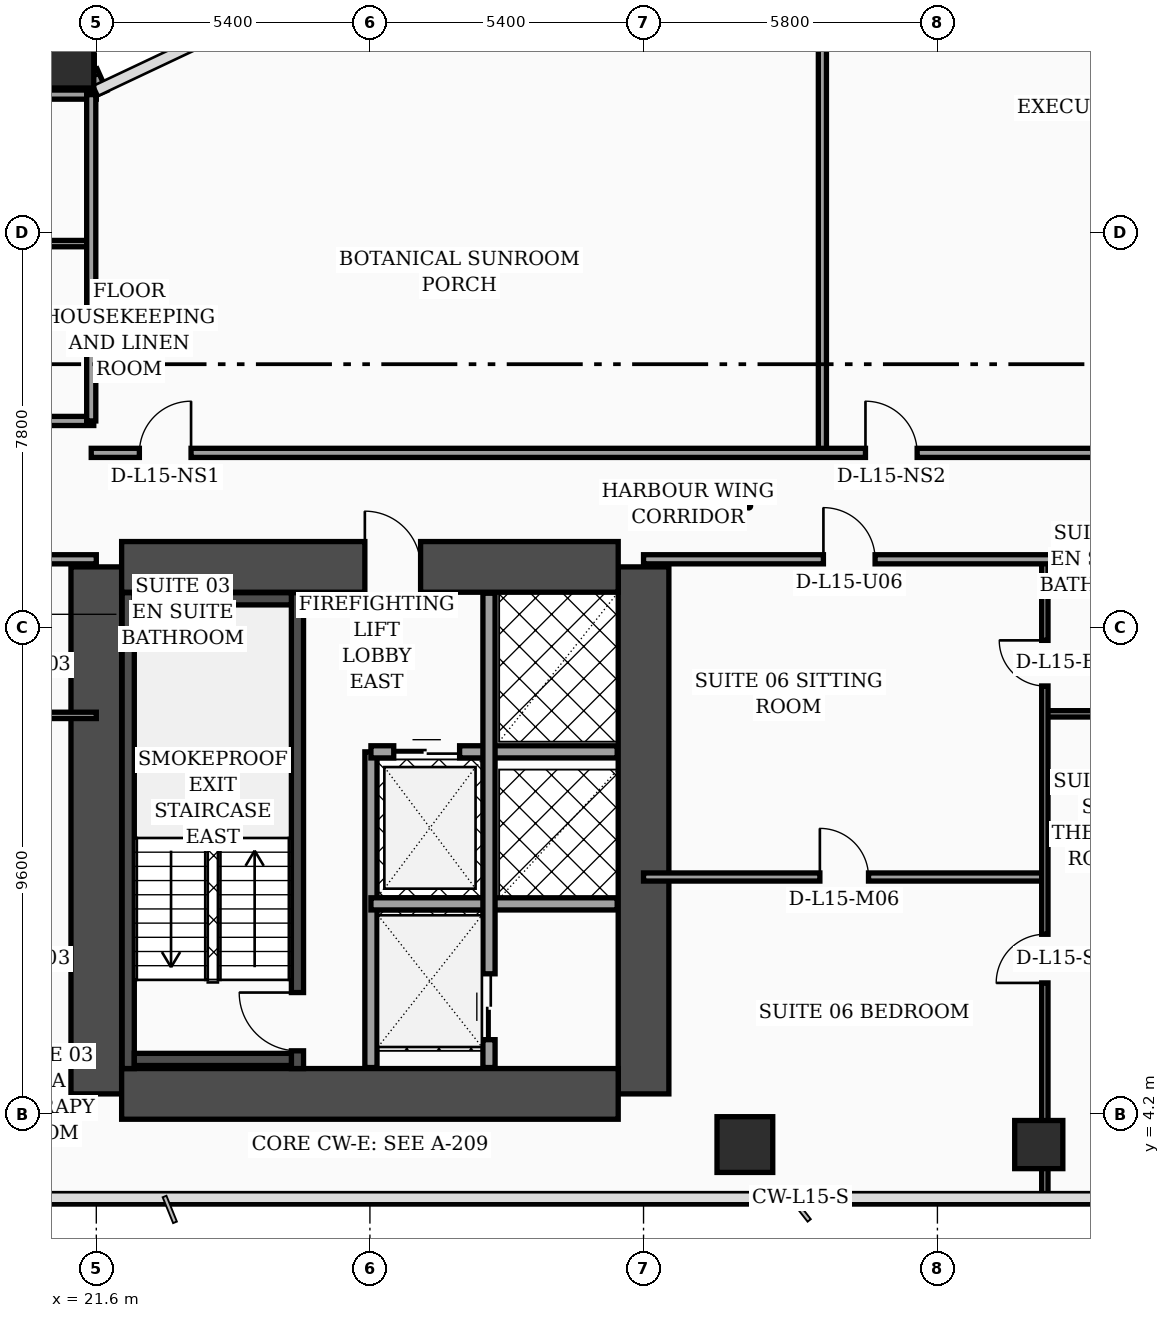
"""IFC4 building model, lengths in metres.
Left out: names, types, materials, properties, quantities, classifications, styles, units other than length and angle.
Written with IfcOpenShell. Run it as: python <this file> out.ifc"""

import sys

from ifc_helpers import new_model, si_unit, direction, frame, frame_2d, origin, origin_2d, place, context, subcontext, project, spatial, rectangle, hollow_rectangle, extrude, element, fill, save


model = new_model("IFC4")
c1 = context("Model", 3, precision=1e-05, world=origin(), true_north=direction((0.0, 1.0)))
c2 = subcontext(c1, "Body", "Model", "MODEL_VIEW")
j1 = project(units=[si_unit("LENGTHUNIT", "METRE"), si_unit("PLANEANGLEUNIT", "RADIAN")], contexts=[c1])
p1 = place(None, origin())
s1 = spatial("IfcSite", under=j1, at=p1, CompositionType="ELEMENT")
p2 = place(p1, origin())
s2 = spatial("IfcBuilding", under=s1, at=p2, CompositionType="ELEMENT")
p3 = place(p2, frame((0.0, 0.0, 66.0)))
s3 = spatial("IfcBuildingStorey", under=s2, at=p3, CompositionType="ELEMENT", Elevation=66.0)
for number, where, z_axis, x_axis in (
    (1, (21.6, 4.6, 0.0), (0.0, 0.0, 1.0), (0.0, 1.0, 0.0)),
    (2, (32.4, 4.6, 0.0), (0.0, 0.0, 1.0), (0.0, 1.0, 0.0)),
):
    element("IfcWall", number, at=place(p3, frame(where, z_axis=z_axis, x_axis=x_axis)), inside=s3, PredefinedType="SHEAR", context=c2, shape_type="SweptSolid", body=[
        extrude(rectangle(XDim=10.4, YDim=1.0, at=frame_2d((5.2, 0.0))), origin(), (0.0, 0.0, 1.0), 3.56),
    ])
p4 = place(p3, frame((22.1, 15.0, 0.0), z_axis=(0.0, 0.0, 1.0), x_axis=(1.0, 0.0, 0.0)))
e3 = element("IfcWall", 3, at=p4, inside=s3, PredefinedType="SHEAR", context=c2, shape_type="SweptSolid", body=[
    extrude(rectangle(XDim=9.8, YDim=1.0, at=frame_2d((4.9, 0.0))), origin(), (0.0, 0.0, 1.0), 3.56),
])
p5 = place(p4, frame((4.8, 0.0, 0.0)))
e4 = element("IfcOpeningElement", 4, at=p5, cuts=e3, PredefinedType="OPENING", context=c2, shape_type="SweptSolid", body=[
    extrude(rectangle(XDim=1.1, YDim=2.2, at=frame_2d((0.55, 1.1))), frame((0.0, 0.51, 0.0), z_axis=(0.0, -1.0, 0.0), x_axis=(1.0, 0.0, 0.0)), (0.0, 0.0, 1.0), 1.02),
])
p6 = place(p3, frame((22.1, 4.6, 0.0), z_axis=(0.0, 0.0, 1.0), x_axis=(1.0, 0.0, 0.0)))
e5 = element("IfcWall", 5, at=p6, inside=s3, PredefinedType="SHEAR", context=c2, shape_type="SweptSolid", body=[
    extrude(rectangle(XDim=9.8, YDim=1.0, at=frame_2d((4.9, 0.0))), origin(), (0.0, 0.0, 1.0), 3.56),
])
p7 = place(p3, frame((22.23, 5.1, 0.0), z_axis=(0.0, 0.0, 1.0), x_axis=(0.0, 1.0, 0.0)))
e6 = element("IfcWall", 6, at=p7, inside=s3, PredefinedType="SOLIDWALL", context=c2, shape_type="SweptSolid", body=[
    extrude(rectangle(XDim=9.39, YDim=0.24, at=frame_2d((4.695, 0.0))), origin(), (0.0, 0.0, 1.0), 3.56),
])
p8 = place(p3, frame((25.57, 5.1, 0.0), z_axis=(0.0, 0.0, 1.0), x_axis=(0.0, 1.0, 0.0)))
e7 = element("IfcWall", 7, at=p8, inside=s3, PredefinedType="SOLIDWALL", context=c2, shape_type="SweptSolid", body=[
    extrude(rectangle(XDim=9.39, YDim=0.24, at=frame_2d((4.695, 0.0))), origin(), (0.0, 0.0, 1.0), 3.56),
])
p9 = place(p8, frame((0.35, 0.0, 0.0)))
e8 = element("IfcOpeningElement", 8, at=p9, cuts=e7, PredefinedType="OPENING", context=c2, shape_type="SweptSolid", body=[
    extrude(rectangle(XDim=1.15, YDim=2.2, at=frame_2d((0.575, 1.1))), frame((0.0, 0.13, 0.0), z_axis=(0.0, -1.0, 0.0), x_axis=(1.0, 0.0, 0.0)), (0.0, 0.0, 1.0), 0.26),
])
for number, where, z_axis, x_axis in (
    (9, (22.35, 5.28, 0.0), (0.0, 0.0, 1.0), (1.0, 0.0, 0.0)),
    (10, (22.35, 14.37, 0.0), (0.0, 0.0, 1.0), (1.0, 0.0, 0.0)),
):
    element("IfcWall", number, at=place(p3, frame(where, z_axis=z_axis, x_axis=x_axis)), inside=s3, PredefinedType="SOLIDWALL", context=c2, shape_type="SweptSolid", body=[
        extrude(rectangle(XDim=3.1, YDim=0.24, at=frame_2d((1.55, 0.0))), origin(), (0.0, 0.0, 1.0), 3.56),
    ])
for number, where, z_axis, x_axis in (
    (11, (21.0, 25.0, 0.0), (0.0, 0.0, 1.0), (1.0, 0.0, 0.0)),
    (12, (34.4, 3.6, 0.0), (0.0, 0.0, 1.0), (1.0, 0.0, 0.0)),
):
    element("IfcColumn", number, at=place(p3, frame(where, z_axis=z_axis, x_axis=x_axis)), inside=s3, PredefinedType="COLUMN", context=c2, shape_type="SweptSolid", body=[
        extrude(hollow_rectangle(XDim=1.1, YDim=1.1, WallThickness=0.045, at=origin_2d()), origin(), (0.0, 0.0, 1.0), 3.56),
    ])
p10 = place(p3, frame((40.2, 3.6, 0.0), z_axis=(0.0, 0.0, 1.0), x_axis=(1.0, 0.0, 0.0)))
e13 = element("IfcColumn", 13, at=p10, inside=s3, PredefinedType="COLUMN", context=c2, shape_type="SweptSolid", body=[
    extrude(hollow_rectangle(XDim=0.95, YDim=0.95, WallThickness=0.04, at=origin_2d()), origin(), (0.0, 0.0, 1.0), 3.56),
])
p11 = place(p3, frame((21.68, 24.34, 0.0), z_axis=(0.0, 0.0, 1.0), x_axis=(-0.40758134973, 0.913168901875, 0.0)))
e14 = element("IfcWall", 14, at=p11, inside=s3, PredefinedType="SOLIDWALL", context=c2, shape_type="SweptSolid", body=[
    extrude(rectangle(XDim=0.471, YDim=0.28, at=frame_2d((0.235, 0.0))), origin(), (0.0, 0.0, 1.0), 3.56),
])
p12 = place(p3, frame((27.02, 5.12, 0.0), z_axis=(0.0, 0.0, 1.0), x_axis=(0.0, 1.0, 0.0)))
e15 = element("IfcWall", 15, at=p12, inside=s3, PredefinedType="SOLIDWALL", context=c2, shape_type="SweptSolid", body=[
    extrude(rectangle(XDim=6.23, YDim=0.24, at=frame_2d((3.115, 0.0))), origin(), (0.0, 0.0, 1.0), 3.56),
])
p13 = place(p3, frame((27.02, 11.35, 0.0), z_axis=(0.0, 0.0, 1.0), x_axis=(1.0, 0.0, 0.0)))
e16 = element("IfcWall", 16, at=p13, inside=s3, PredefinedType="SOLIDWALL", context=c2, shape_type="SweptSolid", body=[
    extrude(rectangle(XDim=4.86, YDim=0.24, at=frame_2d((2.43, 0.0))), origin(), (0.0, 0.0, 1.0), 3.56),
])
p14 = place(p13, frame((0.45, 0.0, 0.0)))
e17 = element("IfcOpeningElement", 17, at=p14, cuts=e16, PredefinedType="OPENING", context=c2, shape_type="SweptSolid", body=[
    extrude(rectangle(XDim=1.3, YDim=2.35, at=frame_2d((0.65, 1.175))), frame((0.0, 0.13, 0.0), z_axis=(0.0, -1.0, 0.0), x_axis=(1.0, 0.0, 0.0)), (0.0, 0.0, 1.0), 0.26),
])
p15 = place(p3, frame((27.02, 8.35, 0.0), z_axis=(0.0, 0.0, 1.0), x_axis=(1.0, 0.0, 0.0)))
e18 = element("IfcWall", 18, at=p15, inside=s3, PredefinedType="SOLIDWALL", context=c2, shape_type="SweptSolid", body=[
    extrude(rectangle(XDim=4.86, YDim=0.24, at=frame_2d((2.43, 0.0))), origin(), (0.0, 0.0, 1.0), 3.56),
])
p16 = place(p3, frame((29.35, 5.12, 0.0), z_axis=(0.0, 0.0, 1.0), x_axis=(0.0, 1.0, 0.0)))
e19 = element("IfcWall", 19, at=p16, inside=s3, PredefinedType="SOLIDWALL", context=c2, shape_type="SweptSolid", body=[
    extrude(rectangle(XDim=9.36, YDim=0.24, at=frame_2d((4.68, 0.0))), origin(), (0.0, 0.0, 1.0), 3.56),
])
p17 = place(p16, frame((0.55, 0.0, 0.0)))
e20 = element("IfcOpeningElement", 20, at=p17, cuts=e19, PredefinedType="OPENING", context=c2, shape_type="SweptSolid", body=[
    extrude(rectangle(XDim=1.3, YDim=2.35, at=frame_2d((0.65, 1.175))), frame((0.0, 0.13, 0.0), z_axis=(0.0, -1.0, 0.0), x_axis=(1.0, 0.0, 0.0)), (0.0, 0.0, 1.0), 0.26),
])
p18 = place(p3, frame((19.6, 12.07, 0.0), z_axis=(0.0, 0.0, 1.0), x_axis=(1.0, 0.0, 0.0)))
e21 = element("IfcWall", 21, at=p18, inside=s3, PredefinedType="PARTITIONING", context=c2, shape_type="SweptSolid", body=[
    extrude(rectangle(XDim=2.0, YDim=0.125, at=frame_2d((1.0, 0.0))), origin(), (0.0, 0.0, 1.0), 3.56),
])
p19 = place(p3, frame((15.15, 15.15, 0.0), z_axis=(0.0, 0.0, 1.0), x_axis=(1.0, 0.0, 0.0)))
e22 = element("IfcWall", 22, at=p19, inside=s3, PredefinedType="PARTITIONING", context=c2, shape_type="SweptSolid", body=[
    extrude(rectangle(XDim=6.45, YDim=0.18, at=frame_2d((3.225, 0.0))), origin(), (0.0, 0.0, 1.0), 2.34),
])
p20 = place(p19, frame((1.74, 0.0, 0.0)))
e23 = element("IfcOpeningElement", 23, at=p20, cuts=e22, PredefinedType="OPENING", context=c2, shape_type="SweptSolid", body=[
    extrude(rectangle(XDim=1.02, YDim=2.2, at=frame_2d((0.51, 1.1))), frame((0.0, 0.1, 0.0), z_axis=(0.0, -1.0, 0.0), x_axis=(1.0, 0.0, 0.0)), (0.0, 0.0, 1.0), 0.2),
])
p21 = place(p3, frame((17.65, 17.88, 0.0), z_axis=(0.0, 0.0, 1.0), x_axis=(1.0, 0.0, 0.0)))
e24 = element("IfcWall", 24, at=p21, inside=s3, PredefinedType="PARTITIONING", context=c2, shape_type="SweptSolid", body=[
    extrude(rectangle(XDim=3.9, YDim=0.18, at=frame_2d((1.95, 0.0))), origin(), (0.0, 0.0, 1.0), 3.56),
])
p22 = place(p3, frame((17.65, 21.38, 0.0), z_axis=(0.0, 0.0, 1.0), x_axis=(1.0, 0.0, 0.0)))
e25 = element("IfcWall", 25, at=p22, inside=s3, PredefinedType="PARTITIONING", context=c2, shape_type="SweptSolid", body=[
    extrude(rectangle(XDim=3.9, YDim=0.125, at=frame_2d((1.95, 0.0))), origin(), (0.0, 0.0, 1.0), 3.09),
])
p23 = place(p3, frame((17.65, 24.32, 0.0), z_axis=(0.0, 0.0, 1.0), x_axis=(1.0, 0.0, 0.0)))
e26 = element("IfcWall", 26, at=p23, inside=s3, PredefinedType="PARTITIONING", context=c2, shape_type="SweptSolid", body=[
    extrude(rectangle(XDim=3.95, YDim=0.18, at=frame_2d((1.975, 0.0))), origin(), (0.0, 0.0, 1.0), 3.56),
])
p24 = place(p3, frame((21.5, 17.88, 0.0), z_axis=(0.0, 0.0, 1.0), x_axis=(0.0, 1.0, 0.0)))
e27 = element("IfcWall", 27, at=p24, inside=s3, PredefinedType="PARTITIONING", context=c2, shape_type="SweptSolid", body=[
    extrude(rectangle(XDim=6.44, YDim=0.18, at=frame_2d((3.22, 0.0))), origin(), (0.0, 0.0, 1.0), 3.09),
])
p25 = place(p3, frame((40.32, 12.1, 0.0), z_axis=(0.0, 0.0, 1.0), x_axis=(1.0, 0.0, 0.0)))
e28 = element("IfcWall", 28, at=p25, inside=s3, PredefinedType="PARTITIONING", context=c2, shape_type="SweptSolid", body=[
    extrude(rectangle(XDim=2.13, YDim=0.125, at=frame_2d((1.065, 0.0))), origin(), (0.0, 0.0, 1.0), 3.56),
])
p26 = place(p3, frame((32.4, 8.88, 0.0), z_axis=(0.0, 0.0, 1.0), x_axis=(1.0, 0.0, 0.0)))
e29 = element("IfcWall", 29, at=p26, inside=s3, PredefinedType="PARTITIONING", context=c2, shape_type="SweptSolid", body=[
    extrude(rectangle(XDim=7.92, YDim=0.16, at=frame_2d((3.96, 0.0))), origin(), (0.0, 0.0, 1.0), 2.84),
])
p27 = place(p26, frame((3.48, 0.0, 0.0)))
e30 = element("IfcOpeningElement", 30, at=p27, cuts=e29, PredefinedType="OPENING", context=c2, shape_type="SweptSolid", body=[
    extrude(rectangle(XDim=0.96, YDim=2.2, at=frame_2d((0.48, 1.1))), frame((0.0, 0.09, 0.0), z_axis=(0.0, -1.0, 0.0), x_axis=(1.0, 0.0, 0.0)), (0.0, 0.0, 1.0), 0.18),
])
p28 = place(p3, frame((40.32, 2.44, 0.0), z_axis=(0.0, 0.0, 1.0), x_axis=(0.0, 1.0, 0.0)))
e31 = element("IfcWall", 31, at=p28, inside=s3, PredefinedType="PARTITIONING", context=c2, shape_type="SweptSolid", body=[
    extrude(rectangle(XDim=12.71, YDim=0.125, at=frame_2d((6.355, 0.0))), origin(), (0.0, 0.0, 1.0), 2.84),
])
p29 = place(p28, frame((4.35, 0.0, 0.0)))
e32 = element("IfcOpeningElement", 32, at=p29, cuts=e31, PredefinedType="OPENING", context=c2, shape_type="SweptSolid", body=[
    extrude(rectangle(XDim=0.96, YDim=2.2, at=frame_2d((0.48, 1.1))), frame((0.0, 0.073, 0.0), z_axis=(0.0, -1.0, 0.0), x_axis=(1.0, 0.0, 0.0)), (0.0, 0.0, 1.0), 0.145),
])
p30 = place(p28, frame((10.21, 0.0, 0.0)))
e33 = element("IfcOpeningElement", 33, at=p30, cuts=e31, PredefinedType="OPENING", context=c2, shape_type="SweptSolid", body=[
    extrude(rectangle(XDim=0.9, YDim=2.15, at=frame_2d((0.45, 1.075))), frame((0.0, 0.073, 0.0), z_axis=(0.0, -1.0, 0.0), x_axis=(1.0, 0.0, 0.0)), (0.0, 0.0, 1.0), 0.145),
])
p31 = place(p3, frame((32.4, 15.15, 0.0), z_axis=(0.0, 0.0, 1.0), x_axis=(1.0, 0.0, 0.0)))
e34 = element("IfcWall", 34, at=p31, inside=s3, PredefinedType="PARTITIONING", context=c2, shape_type="SweptSolid", body=[
    extrude(rectangle(XDim=18.9, YDim=0.18, at=frame_2d((9.45, 0.0))), origin(), (0.0, 0.0, 1.0), 2.84),
])
p32 = place(p31, frame((3.55, 0.0, 0.0)))
e35 = element("IfcOpeningElement", 35, at=p32, cuts=e34, PredefinedType="OPENING", context=c2, shape_type="SweptSolid", body=[
    extrude(rectangle(XDim=1.02, YDim=2.2, at=frame_2d((0.51, 1.1))), frame((0.0, 0.1, 0.0), z_axis=(0.0, -1.0, 0.0), x_axis=(1.0, 0.0, 0.0)), (0.0, 0.0, 1.0), 0.2),
])
p33 = place(p31, frame((12.9, 0.0, 0.0)))
e36 = element("IfcOpeningElement", 36, at=p33, cuts=e34, PredefinedType="OPENING", context=c2, shape_type="SweptSolid", body=[
    extrude(rectangle(XDim=1.02, YDim=2.2, at=frame_2d((0.51, 1.1))), frame((0.0, 0.1, 0.0), z_axis=(0.0, -1.0, 0.0), x_axis=(1.0, 0.0, 0.0)), (0.0, 0.0, 1.0), 0.2),
])
p34 = place(p3, frame((35.93, 17.25, 0.0), z_axis=(0.0, 0.0, 1.0), x_axis=(0.0, 1.0, 0.0)))
e37 = element("IfcWall", 37, at=p34, inside=s3, PredefinedType="PARTITIONING", context=c2, shape_type="SweptSolid", body=[
    extrude(rectangle(XDim=14.0, YDim=0.16, at=frame_2d((7.0, 0.0))), origin(), (0.0, 0.0, 1.0), 2.84),
])
p35 = place(p3, frame((21.5, 17.25, 0.0), z_axis=(0.0, 0.0, 1.0), x_axis=(1.0, 0.0, 0.0)))
e38 = element("IfcWall", 38, at=p35, inside=s3, PredefinedType="PARTITIONING", context=c2, shape_type="SweptSolid", body=[
    extrude(rectangle(XDim=27.45, YDim=0.18, at=frame_2d((13.725, 0.0))), origin(), (0.0, 0.0, 1.0), 2.84),
])
p36 = place(p35, frame((0.95, 0.0, 0.0)))
e39 = element("IfcOpeningElement", 39, at=p36, cuts=e38, PredefinedType="OPENING", context=c2, shape_type="SweptSolid", body=[
    extrude(rectangle(XDim=1.02, YDim=2.2, at=frame_2d((0.51, 1.1))), frame((0.0, 0.1, 0.0), z_axis=(0.0, -1.0, 0.0), x_axis=(1.0, 0.0, 0.0)), (0.0, 0.0, 1.0), 0.2),
])
p37 = place(p35, frame((15.28, 0.0, 0.0)))
e40 = element("IfcOpeningElement", 40, at=p37, cuts=e38, PredefinedType="OPENING", context=c2, shape_type="SweptSolid", body=[
    extrude(rectangle(XDim=1.02, YDim=2.2, at=frame_2d((0.51, 1.1))), frame((0.0, 0.1, 0.0), z_axis=(0.0, -1.0, 0.0), x_axis=(1.0, 0.0, 0.0)), (0.0, 0.0, 1.0), 0.2),
])
p38 = place(p14, origin())
e41 = element("IfcDoor", 41, at=p38, inside=s3, OperationType="DOUBLE_DOOR_SLIDING", PredefinedType="DOOR", context=c2, shape_type="SweptSolid", body=[
    extrude(rectangle(XDim=1.3, YDim=2.35, at=frame_2d((0.65, 1.175))), frame((0.0, 0.025, 0.0), z_axis=(0.0, -1.0, 0.0), x_axis=(1.0, 0.0, 0.0)), (0.0, 0.0, 1.0), 0.05),
])
fill(e17, e41)
p39 = place(p17, origin())
e42 = element("IfcDoor", 42, at=p39, inside=s3, OperationType="DOUBLE_DOOR_SLIDING", PredefinedType="DOOR", context=c2, shape_type="SweptSolid", body=[
    extrude(rectangle(XDim=1.3, YDim=2.35, at=frame_2d((0.65, 1.175))), frame((0.0, 0.025, 0.0), z_axis=(0.0, -1.0, 0.0), x_axis=(1.0, 0.0, 0.0)), (0.0, 0.0, 1.0), 0.05),
])
fill(e20, e42)
p40 = place(p27, origin())
e43 = element("IfcDoor", 43, at=p40, inside=s3, OperationType="SINGLE_SWING_LEFT", PredefinedType="DOOR", context=c2, shape_type="SweptSolid", body=[
    extrude(rectangle(XDim=0.96, YDim=2.2, at=frame_2d((0.48, 1.1))), frame((0.0, 0.025, 0.0), z_axis=(0.0, -1.0, 0.0), x_axis=(1.0, 0.0, 0.0)), (0.0, 0.0, 1.0), 0.05),
])
fill(e30, e43)
p41 = place(p29, origin())
e44 = element("IfcDoor", 44, at=p41, inside=s3, OperationType="SINGLE_SWING_LEFT", PredefinedType="DOOR", context=c2, shape_type="SweptSolid", body=[
    extrude(rectangle(XDim=0.96, YDim=2.2, at=frame_2d((0.48, 1.1))), frame((0.0, 0.025, 0.0), z_axis=(0.0, -1.0, 0.0), x_axis=(1.0, 0.0, 0.0)), (0.0, 0.0, 1.0), 0.05),
])
fill(e32, e44)
p42 = place(p30, origin())
e45 = element("IfcDoor", 45, at=p42, inside=s3, OperationType="SINGLE_SWING_RIGHT", PredefinedType="DOOR", context=c2, shape_type="SweptSolid", body=[
    extrude(rectangle(XDim=0.9, YDim=2.15, at=frame_2d((0.45, 1.075))), frame((0.0, 0.025, 0.0), z_axis=(0.0, -1.0, 0.0), x_axis=(1.0, 0.0, 0.0)), (0.0, 0.0, 1.0), 0.05),
])
fill(e33, e45)
p43 = place(p32, origin())
e46 = element("IfcDoor", 46, at=p43, inside=s3, OperationType="SINGLE_SWING_LEFT", PredefinedType="DOOR", context=c2, shape_type="SweptSolid", body=[
    extrude(rectangle(XDim=1.02, YDim=2.2, at=frame_2d((0.51, 1.1))), frame((0.0, 0.025, 0.0), z_axis=(0.0, -1.0, 0.0), x_axis=(1.0, 0.0, 0.0)), (0.0, 0.0, 1.0), 0.05),
])
fill(e35, e46)
p44 = place(p36, origin())
e47 = element("IfcDoor", 47, at=p44, inside=s3, OperationType="SINGLE_SWING_RIGHT", PredefinedType="DOOR", context=c2, shape_type="SweptSolid", body=[
    extrude(rectangle(XDim=1.02, YDim=2.2, at=frame_2d((0.51, 1.1))), frame((0.0, 0.025, 0.0), z_axis=(0.0, -1.0, 0.0), x_axis=(1.0, 0.0, 0.0)), (0.0, 0.0, 1.0), 0.05),
])
fill(e39, e47)
p45 = place(p37, origin())
e48 = element("IfcDoor", 48, at=p45, inside=s3, OperationType="SINGLE_SWING_LEFT", PredefinedType="DOOR", context=c2, shape_type="SweptSolid", body=[
    extrude(rectangle(XDim=1.02, YDim=2.2, at=frame_2d((0.51, 1.1))), frame((0.0, 0.025, 0.0), z_axis=(0.0, -1.0, 0.0), x_axis=(1.0, 0.0, 0.0)), (0.0, 0.0, 1.0), 0.05),
])
fill(e40, e48)
p46 = place(p9, origin())
e49 = element("IfcDoor", 49, at=p46, inside=s3, OperationType="SINGLE_SWING_RIGHT", PredefinedType="DOOR", context=c2, shape_type="SweptSolid", body=[
    extrude(rectangle(XDim=1.15, YDim=2.2, at=frame_2d((0.575, 1.1))), frame((0.0, 0.025, 0.0), z_axis=(0.0, -1.0, 0.0), x_axis=(1.0, 0.0, 0.0)), (0.0, 0.0, 1.0), 0.05),
])
fill(e8, e49)
p47 = place(p5, origin())
e50 = element("IfcDoor", 50, at=p47, inside=s3, OperationType="SINGLE_SWING_LEFT", PredefinedType="DOOR", context=c2, shape_type="SweptSolid", body=[
    extrude(rectangle(XDim=1.1, YDim=2.2, at=frame_2d((0.55, 1.1))), frame((0.0, 0.025, 0.0), z_axis=(0.0, -1.0, 0.0), x_axis=(1.0, 0.0, 0.0)), (0.0, 0.0, 1.0), 0.05),
])
fill(e4, e50)
save(model, sys.argv[1])
